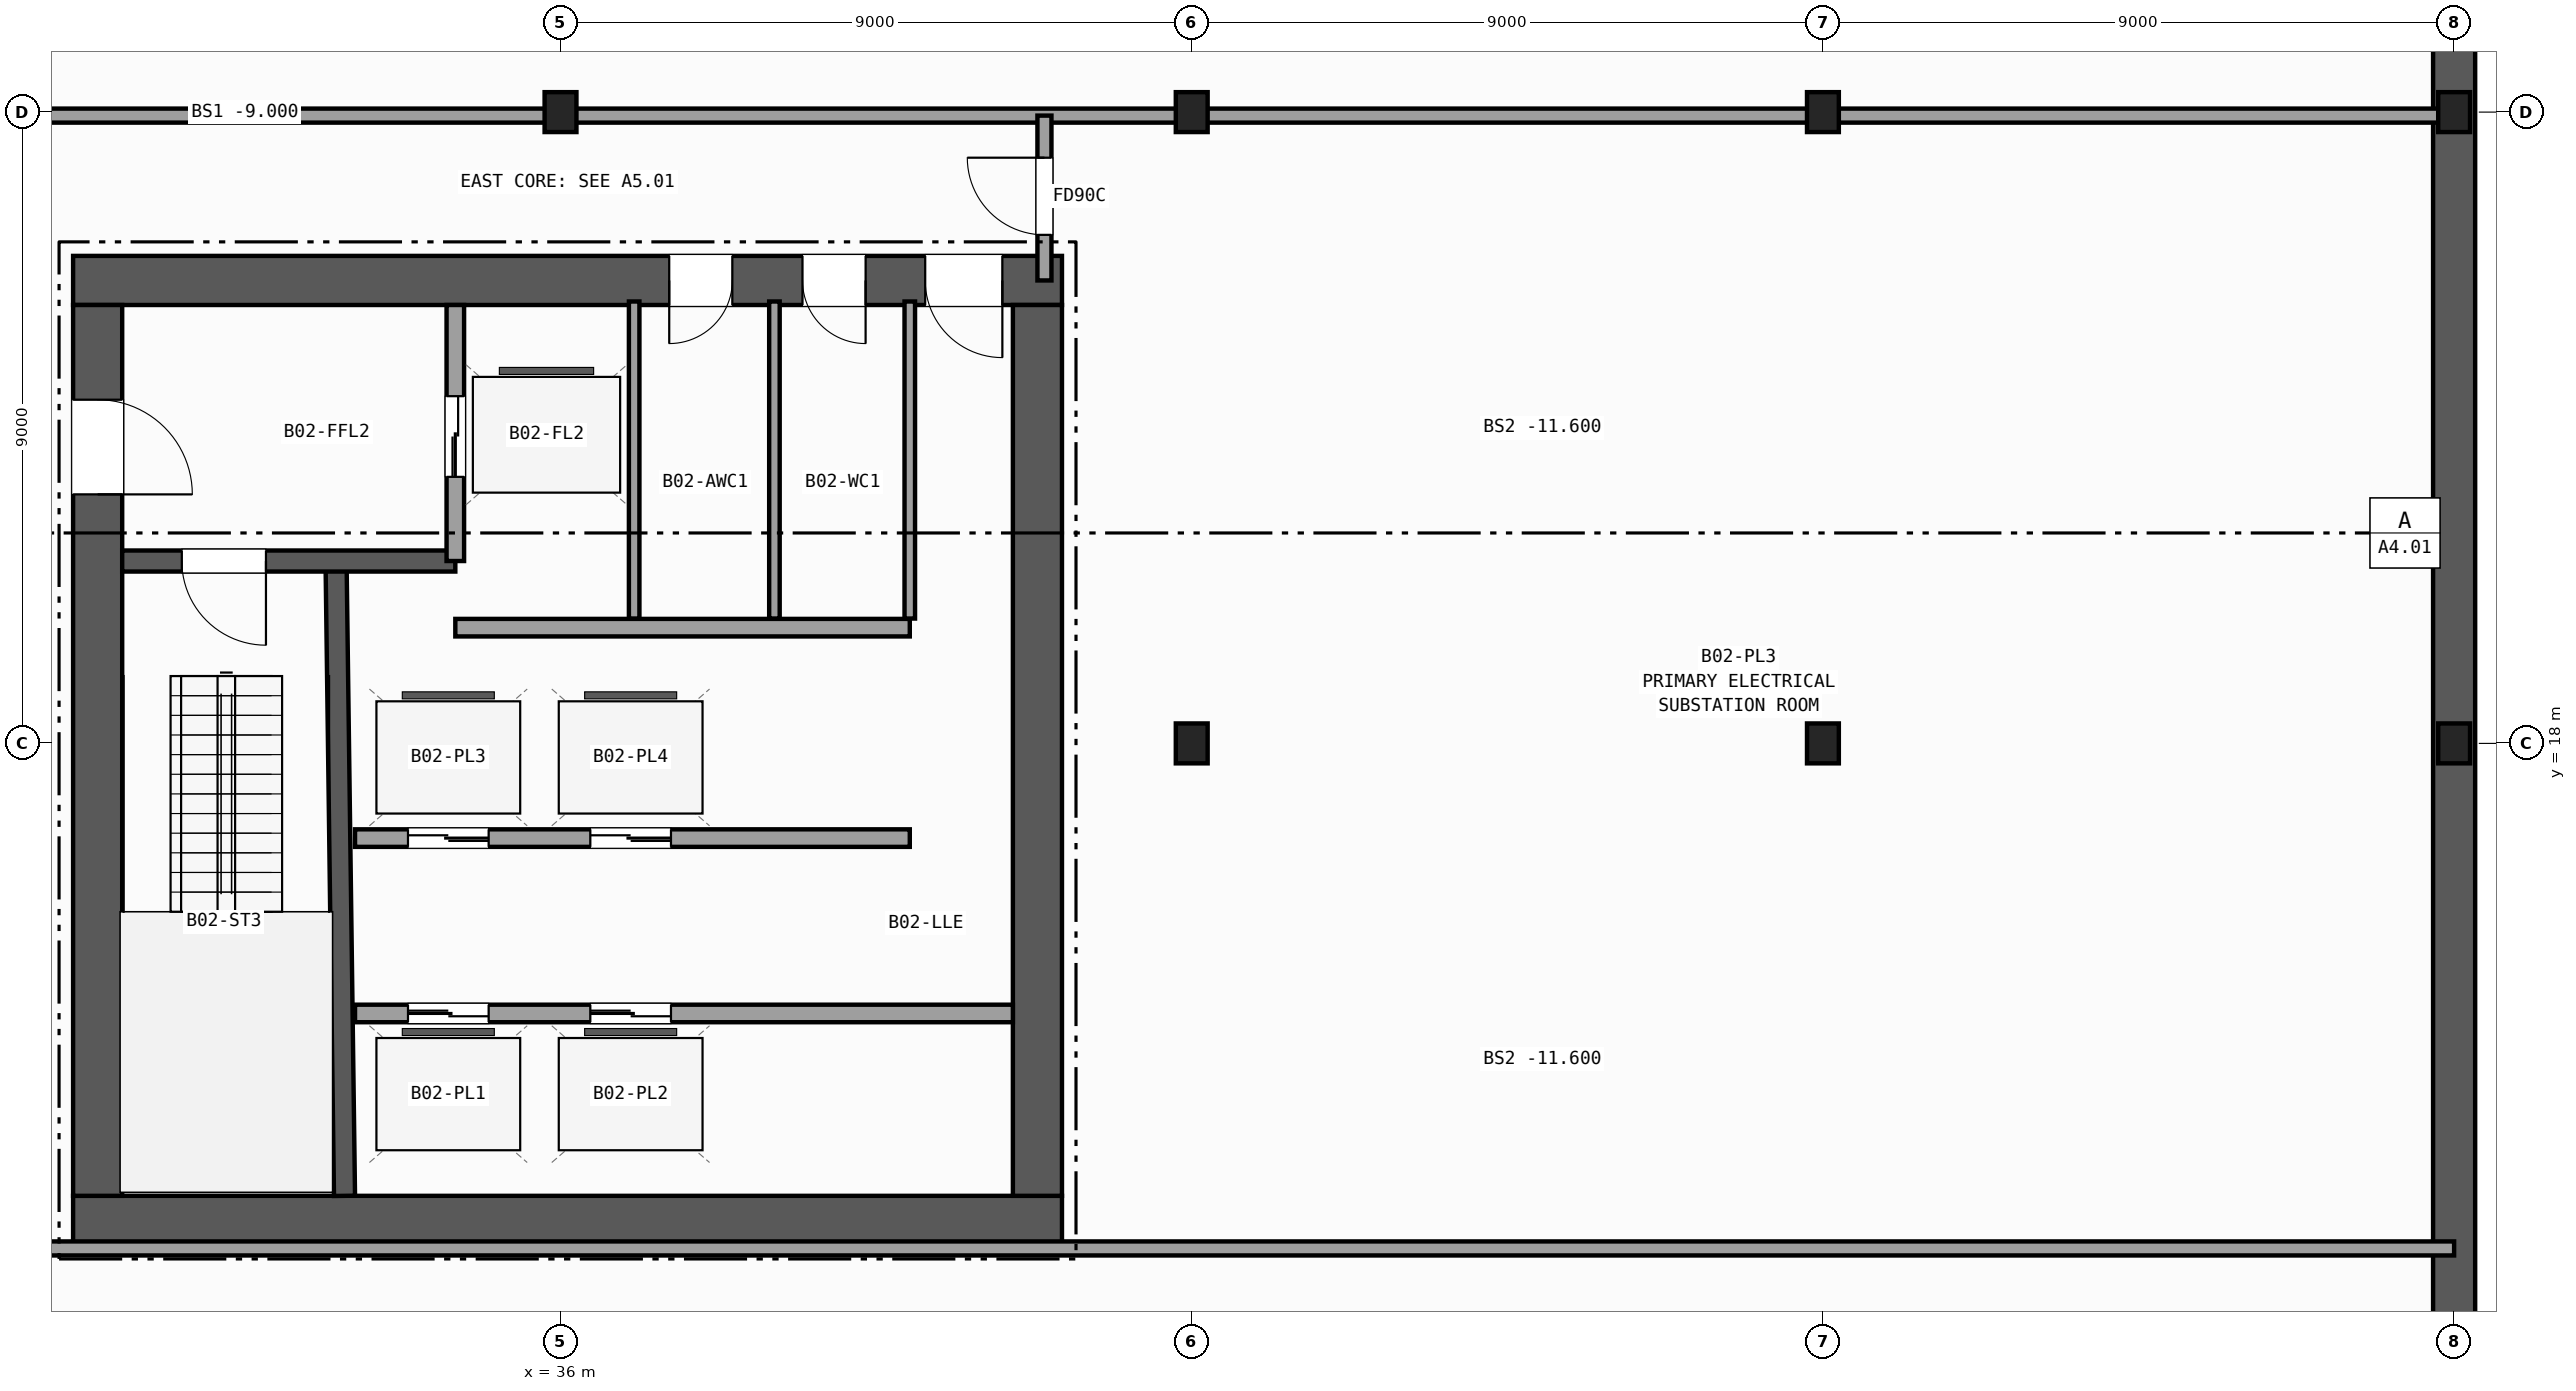
"""IFC4 building model, lengths in metres.
Left out: names, types, materials, properties, quantities, classifications, styles, units other than length and angle.
Written with IfcOpenShell. Run it as: python <this file> out.ifc"""

import sys

from ifc_helpers import new_model, si_unit, direction, frame, frame_2d, origin, origin_2d, place, context, subcontext, project, spatial, rectangle, i_section, extrude, element, fill, save


model = new_model("IFC4")
c1 = context("Model", 3, precision=1e-05, world=origin(), true_north=direction((0.0, 1.0)))
c2 = subcontext(c1, "Body", "Model", "MODEL_VIEW")
j1 = project(units=[si_unit("LENGTHUNIT", "METRE"), si_unit("PLANEANGLEUNIT", "RADIAN")], contexts=[c1])
p1 = place(None, origin())
s1 = spatial("IfcSite", under=j1, at=p1, CompositionType="ELEMENT")
p2 = place(p1, origin())
s2 = spatial("IfcBuilding", under=s1, at=p2, CompositionType="ELEMENT")
p3 = place(p2, frame((0.0, 0.0, -9.0)))
s3 = spatial("IfcBuildingStorey", under=s2, at=p3, CompositionType="ELEMENT", Elevation=-9.0)
for number, where, z_axis, x_axis in (
    (1, (36.0, 27.0, 0.0), (0.0, 0.0, 1.0), (1.0, 0.0, 0.0)),
    (2, (45.0, 18.0, 0.0), (0.0, 0.0, 1.0), (1.0, 0.0, 0.0)),
    (3, (45.0, 27.0, 0.0), (0.0, 0.0, 1.0), (1.0, 0.0, 0.0)),
    (4, (54.0, 18.0, 0.0), (0.0, 0.0, 1.0), (1.0, 0.0, 0.0)),
    (5, (54.0, 27.0, 0.0), (0.0, 0.0, 1.0), (1.0, 0.0, 0.0)),
    (6, (63.0, 18.0, 0.0), (0.0, 0.0, 1.0), (1.0, 0.0, 0.0)),
    (7, (63.0, 27.0, 0.0), (0.0, 0.0, 1.0), (1.0, 0.0, 0.0)),
):
    element("IfcColumn", number, at=place(p3, frame(where, z_axis=z_axis, x_axis=x_axis)), inside=s3, PredefinedType="COLUMN", context=c2, shape_type="SweptSolid", body=[
        extrude(i_section(OverallWidth=0.454, OverallDepth=0.569, WebThickness=0.078, FlangeThickness=0.125, FilletRadius=0.015, at=origin_2d()), origin(), (0.0, 0.0, 1.0), 4.5),
    ])
p4 = place(p3, frame((63.0, 54.3, 0.0), z_axis=(0.0, 0.0, 1.0), x_axis=(0.0, -1.0, 0.0)))
e8 = element("IfcWall", 8, at=p4, inside=s3, PredefinedType="SOLIDWALL", context=c2, shape_type="SweptSolid", body=[
    extrude(rectangle(XDim=54.6, YDim=0.6, at=frame_2d((27.3, 0.0))), origin(), (0.0, 0.0, 1.0), 4.15),
])
p5 = place(p3, frame((29.05, 11.2, 0.0), z_axis=(0.0, 0.0, 1.0), x_axis=(1.0, 0.0, 0.0)))
e9 = element("IfcWall", 9, at=p5, inside=s3, PredefinedType="SHEAR", context=c2, shape_type="SweptSolid", body=[
    extrude(rectangle(XDim=14.1, YDim=0.7, at=frame_2d((7.05, 0.0))), origin(), (0.0, 0.0, 1.0), 4.15),
])
p6 = place(p3, frame((43.15, 24.6, 0.0), z_axis=(0.0, 0.0, 1.0), x_axis=(-1.0, 0.0, 0.0)))
e10 = element("IfcWall", 10, at=p6, inside=s3, PredefinedType="SHEAR", context=c2, shape_type="SweptSolid", body=[
    extrude(rectangle(XDim=14.1, YDim=0.7, at=frame_2d((7.05, 0.0))), origin(), (0.0, 0.0, 1.0), 4.15),
])
p7 = place(p6, frame((0.85, 0.0, 0.0)))
e11 = element("IfcOpeningElement", 11, at=p7, cuts=e10, PredefinedType="OPENING", context=c2, shape_type="SweptSolid", body=[
    extrude(rectangle(XDim=1.1, YDim=2.15, at=frame_2d((0.55, 1.075))), frame((0.0, 0.36, 0.0), z_axis=(0.0, -1.0, 0.0), x_axis=(1.0, 0.0, 0.0)), (0.0, 0.0, 1.0), 0.72),
])
p8 = place(p6, frame((2.8, 0.0, 0.0)))
e12 = element("IfcOpeningElement", 12, at=p8, cuts=e10, PredefinedType="OPENING", context=c2, shape_type="SweptSolid", body=[
    extrude(rectangle(XDim=0.9, YDim=2.1, at=frame_2d((0.45, 1.05))), frame((0.0, 0.36, 0.0), z_axis=(0.0, -1.0, 0.0), x_axis=(1.0, 0.0, 0.0)), (0.0, 0.0, 1.0), 0.72),
])
p9 = place(p6, frame((4.7, 0.0, 0.0)))
e13 = element("IfcOpeningElement", 13, at=p9, cuts=e10, PredefinedType="OPENING", context=c2, shape_type="SweptSolid", body=[
    extrude(rectangle(XDim=0.9, YDim=2.1, at=frame_2d((0.45, 1.05))), frame((0.0, 0.36, 0.0), z_axis=(0.0, -1.0, 0.0), x_axis=(1.0, 0.0, 0.0)), (0.0, 0.0, 1.0), 0.72),
])
p10 = place(p3, frame((29.4, 24.25, 0.0), z_axis=(0.0, 0.0, 1.0), x_axis=(0.0, -1.0, 0.0)))
e14 = element("IfcWall", 14, at=p10, inside=s3, PredefinedType="SHEAR", context=c2, shape_type="SweptSolid", body=[
    extrude(rectangle(XDim=12.7, YDim=0.7, at=frame_2d((6.35, 0.0))), origin(), (0.0, 0.0, 1.0), 4.15),
])
p11 = place(p10, frame((1.35, 0.0, 0.0)))
e15 = element("IfcOpeningElement", 15, at=p11, cuts=e14, PredefinedType="OPENING", context=c2, shape_type="SweptSolid", body=[
    extrude(rectangle(XDim=1.35, YDim=2.15, at=frame_2d((0.675, 1.075))), frame((0.0, 0.36, 0.0), z_axis=(0.0, -1.0, 0.0), x_axis=(1.0, 0.0, 0.0)), (0.0, 0.0, 1.0), 0.72),
])
p12 = place(p3, frame((42.8, 11.55, 0.0), z_axis=(0.0, 0.0, 1.0), x_axis=(0.0, 1.0, 0.0)))
e16 = element("IfcWall", 16, at=p12, inside=s3, PredefinedType="SHEAR", context=c2, shape_type="SweptSolid", body=[
    extrude(rectangle(XDim=12.7, YDim=0.7, at=frame_2d((6.35, 0.0))), origin(), (0.0, 0.0, 1.0), 4.15),
])
p13 = place(p3, frame((32.92, 11.55, 0.0), z_axis=(0.0, 0.0, 1.0), x_axis=(-0.01331804616, 0.99991131089, 0.0)))
e17 = element("IfcWall", 17, at=p13, inside=s3, PredefinedType="SHEAR", context=c2, shape_type="SweptSolid", body=[
    extrude(rectangle(XDim=9.001, YDim=0.3, at=frame_2d((4.5, 0.0))), origin(), (0.0, 0.0, 1.0), 4.15),
])
p14 = place(p3, frame((34.5, 20.6, 0.0), z_axis=(0.0, 0.0, 1.0), x_axis=(-1.0, 0.0, 0.0)))
e18 = element("IfcWall", 18, at=p14, inside=s3, PredefinedType="SHEAR", context=c2, shape_type="SweptSolid", body=[
    extrude(rectangle(XDim=4.75, YDim=0.3, at=frame_2d((2.375, 0.0))), origin(), (0.0, 0.0, 1.0), 4.15),
])
p15 = place(p14, frame((2.7, 0.0, 0.0)))
e19 = element("IfcOpeningElement", 19, at=p15, cuts=e18, PredefinedType="OPENING", context=c2, shape_type="SweptSolid", body=[
    extrude(rectangle(XDim=1.2, YDim=2.15, at=frame_2d((0.6, 1.075))), frame((0.0, 0.16, 0.0), z_axis=(0.0, -1.0, 0.0), x_axis=(1.0, 0.0, 0.0)), (0.0, 0.0, 1.0), 0.32),
])
p16 = place(p3, frame((34.5, 20.6, 0.0), z_axis=(0.0, 0.0, 1.0), x_axis=(0.0, 1.0, 0.0)))
e20 = element("IfcWall", 20, at=p16, inside=s3, PredefinedType="PARTITIONING", context=c2, shape_type="SweptSolid", body=[
    extrude(rectangle(XDim=3.65, YDim=0.25, at=frame_2d((1.825, 0.0))), origin(), (0.0, 0.0, 1.0), 4.15),
])
p17 = place(p16, frame((1.2, 0.0, 0.0)))
e21 = element("IfcOpeningElement", 21, at=p17, cuts=e20, PredefinedType="OPENING", context=c2, shape_type="SweptSolid", body=[
    extrude(rectangle(XDim=1.15, YDim=2.15, at=frame_2d((0.575, 1.075))), frame((0.0, 0.135, 0.0), z_axis=(0.0, -1.0, 0.0), x_axis=(1.0, 0.0, 0.0)), (0.0, 0.0, 1.0), 0.27),
])
p18 = place(p3, frame((34.5, 19.65, 0.0), z_axis=(0.0, 0.0, 1.0), x_axis=(1.0, 0.0, 0.0)))
e22 = element("IfcWall", 22, at=p18, inside=s3, PredefinedType="PARTITIONING", context=c2, shape_type="SweptSolid", body=[
    extrude(rectangle(XDim=6.48, YDim=0.25, at=frame_2d((3.24, 0.0))), origin(), (0.0, 0.0, 1.0), 4.15),
])
p19 = place(p3, frame((33.07, 14.15, 0.0), z_axis=(0.0, 0.0, 1.0), x_axis=(1.0, 0.0, 0.0)))
e23 = element("IfcWall", 23, at=p19, inside=s3, PredefinedType="PARTITIONING", context=c2, shape_type="SweptSolid", body=[
    extrude(rectangle(XDim=9.38, YDim=0.25, at=frame_2d((4.69, 0.0))), origin(), (0.0, 0.0, 1.0), 4.15),
])
p20 = place(p19, frame((0.755, 0.0, 0.0)))
e24 = element("IfcOpeningElement", 24, at=p20, cuts=e23, PredefinedType="OPENING", context=c2, shape_type="SweptSolid", body=[
    extrude(rectangle(XDim=1.15, YDim=2.15, at=frame_2d((0.575, 1.075))), frame((0.0, 0.135, 0.0), z_axis=(0.0, -1.0, 0.0), x_axis=(1.0, 0.0, 0.0)), (0.0, 0.0, 1.0), 0.27),
])
p21 = place(p19, frame((3.355, 0.0, 0.0)))
e25 = element("IfcOpeningElement", 25, at=p21, cuts=e23, PredefinedType="OPENING", context=c2, shape_type="SweptSolid", body=[
    extrude(rectangle(XDim=1.15, YDim=2.15, at=frame_2d((0.575, 1.075))), frame((0.0, 0.135, 0.0), z_axis=(0.0, -1.0, 0.0), x_axis=(1.0, 0.0, 0.0)), (0.0, 0.0, 1.0), 0.27),
])
p22 = place(p3, frame((40.98, 16.65, 0.0), z_axis=(0.0, 0.0, 1.0), x_axis=(-1.0, 0.0, 0.0)))
e26 = element("IfcWall", 26, at=p22, inside=s3, PredefinedType="PARTITIONING", context=c2, shape_type="SweptSolid", body=[
    extrude(rectangle(XDim=7.91, YDim=0.25, at=frame_2d((3.955, 0.0))), origin(), (0.0, 0.0, 1.0), 4.15),
])
p23 = place(p22, frame((6.005, 0.0, 0.0)))
e27 = element("IfcOpeningElement", 27, at=p23, cuts=e26, PredefinedType="OPENING", context=c2, shape_type="SweptSolid", body=[
    extrude(rectangle(XDim=1.15, YDim=2.15, at=frame_2d((0.575, 1.075))), frame((0.0, 0.135, 0.0), z_axis=(0.0, -1.0, 0.0), x_axis=(1.0, 0.0, 0.0)), (0.0, 0.0, 1.0), 0.27),
])
p24 = place(p22, frame((3.405, 0.0, 0.0)))
e28 = element("IfcOpeningElement", 28, at=p24, cuts=e26, PredefinedType="OPENING", context=c2, shape_type="SweptSolid", body=[
    extrude(rectangle(XDim=1.15, YDim=2.15, at=frame_2d((0.575, 1.075))), frame((0.0, 0.135, 0.0), z_axis=(0.0, -1.0, 0.0), x_axis=(1.0, 0.0, 0.0)), (0.0, 0.0, 1.0), 0.27),
])
for number, where, z_axis, x_axis in (
    (29, (37.05, 19.78, 0.0), (0.0, 0.0, 1.0), (0.0, 1.0, 0.0)),
    (30, (39.05, 19.78, 0.0), (0.0, 0.0, 1.0), (0.0, 1.0, 0.0)),
    (31, (40.98, 19.78, 0.0), (0.0, 0.0, 1.0), (0.0, 1.0, 0.0)),
):
    element("IfcWall", number, at=place(p3, frame(where, z_axis=z_axis, x_axis=x_axis)), inside=s3, PredefinedType="PARTITIONING", context=c2, shape_type="SweptSolid", body=[
        extrude(rectangle(XDim=4.52, YDim=0.15, at=frame_2d((2.26, 0.0))), origin(), (0.0, 0.0, 1.0), 4.15),
    ])
p25 = place(p3, frame((27.1, 26.95, 0.0), z_axis=(0.0, 0.0, 1.0), x_axis=(1.0, 0.0, 0.0)))
e32 = element("IfcWall", 32, at=p25, inside=s3, PredefinedType="PARTITIONING", context=c2, shape_type="SweptSolid", body=[
    extrude(rectangle(XDim=35.9, YDim=0.2, at=frame_2d((17.95, 0.0))), origin(), (0.0, 0.0, 1.0), 3.203),
])
p26 = place(p3, frame((42.9, 24.6, 0.0), z_axis=(0.0, 0.0, 1.0), x_axis=(0.0, 1.0, 0.0)))
e33 = element("IfcWall", 33, at=p26, inside=s3, PredefinedType="PARTITIONING", context=c2, shape_type="SweptSolid", body=[
    extrude(rectangle(XDim=2.35, YDim=0.2, at=frame_2d((1.175, 0.0))), origin(), (0.0, 0.0, 1.0), 3.203),
])
p27 = place(p26, frame((0.65, 0.0, 0.0)))
e34 = element("IfcOpeningElement", 34, at=p27, cuts=e33, PredefinedType="OPENING", context=c2, shape_type="SweptSolid", body=[
    extrude(rectangle(XDim=1.1, YDim=2.15, at=frame_2d((0.55, 1.075))), frame((0.0, 0.11, 0.0), z_axis=(0.0, -1.0, 0.0), x_axis=(1.0, 0.0, 0.0)), (0.0, 0.0, 1.0), 0.22),
])
p28 = place(p3, frame((24.65, 10.8, 0.0), z_axis=(0.0, 0.0, 1.0), x_axis=(1.0, 0.0, 0.0)))
e35 = element("IfcWall", 35, at=p28, inside=s3, PredefinedType="PARTITIONING", context=c2, shape_type="SweptSolid", body=[
    extrude(rectangle(XDim=38.35, YDim=0.2, at=frame_2d((19.175, 0.0))), origin(), (0.0, 0.0, 1.0), 3.275),
])
p29 = place(p28, frame((2.0, 0.0, 0.0)))
e36 = element("IfcOpeningElement", 36, at=p29, cuts=e35, PredefinedType="OPENING", context=c2, shape_type="SweptSolid", body=[
    extrude(rectangle(XDim=1.1, YDim=2.15, at=frame_2d((0.55, 1.075))), frame((0.0, 0.11, 0.0), z_axis=(0.0, -1.0, 0.0), x_axis=(1.0, 0.0, 0.0)), (0.0, 0.0, 1.0), 0.22),
])
p30 = place(p15, origin())
e37 = element("IfcDoor", 37, at=p30, inside=s3, OperationType="SINGLE_SWING_LEFT", PredefinedType="DOOR", context=c2, shape_type="SweptSolid", body=[
    extrude(rectangle(XDim=1.2, YDim=2.15, at=frame_2d((0.6, 1.075))), frame((0.0, 0.025, 0.0), z_axis=(0.0, -1.0, 0.0), x_axis=(1.0, 0.0, 0.0)), (0.0, 0.0, 1.0), 0.05),
])
fill(e19, e37)
p31 = place(p11, origin())
e38 = element("IfcDoor", 38, at=p31, inside=s3, OperationType="SINGLE_SWING_RIGHT", PredefinedType="DOOR", context=c2, shape_type="SweptSolid", body=[
    extrude(rectangle(XDim=1.35, YDim=2.15, at=frame_2d((0.675, 1.075))), frame((0.0, 0.025, 0.0), z_axis=(0.0, -1.0, 0.0), x_axis=(1.0, 0.0, 0.0)), (0.0, 0.0, 1.0), 0.05),
])
fill(e15, e38)
p32 = place(p7, origin())
e39 = element("IfcDoor", 39, at=p32, inside=s3, OperationType="SINGLE_SWING_LEFT", PredefinedType="DOOR", context=c2, shape_type="SweptSolid", body=[
    extrude(rectangle(XDim=1.1, YDim=2.15, at=frame_2d((0.55, 1.075))), frame((0.0, 0.025, 0.0), z_axis=(0.0, -1.0, 0.0), x_axis=(1.0, 0.0, 0.0)), (0.0, 0.0, 1.0), 0.05),
])
fill(e11, e39)
p33 = place(p8, origin())
e40 = element("IfcDoor", 40, at=p33, inside=s3, OperationType="SINGLE_SWING_LEFT", PredefinedType="DOOR", context=c2, shape_type="SweptSolid", body=[
    extrude(rectangle(XDim=0.9, YDim=2.1, at=frame_2d((0.45, 1.05))), frame((0.0, 0.025, 0.0), z_axis=(0.0, -1.0, 0.0), x_axis=(1.0, 0.0, 0.0)), (0.0, 0.0, 1.0), 0.05),
])
fill(e12, e40)
p34 = place(p9, origin())
e41 = element("IfcDoor", 41, at=p34, inside=s3, OperationType="SINGLE_SWING_RIGHT", PredefinedType="DOOR", context=c2, shape_type="SweptSolid", body=[
    extrude(rectangle(XDim=0.9, YDim=2.1, at=frame_2d((0.45, 1.05))), frame((0.0, 0.025, 0.0), z_axis=(0.0, -1.0, 0.0), x_axis=(1.0, 0.0, 0.0)), (0.0, 0.0, 1.0), 0.05),
])
fill(e13, e41)
p35 = place(p17, origin())
e42 = element("IfcDoor", 42, at=p35, inside=s3, OperationType="DOUBLE_DOOR_SLIDING", PredefinedType="DOOR", context=c2, shape_type="SweptSolid", body=[
    extrude(rectangle(XDim=1.15, YDim=2.15, at=frame_2d((0.575, 1.075))), frame((0.0, 0.025, 0.0), z_axis=(0.0, -1.0, 0.0), x_axis=(1.0, 0.0, 0.0)), (0.0, 0.0, 1.0), 0.05),
])
fill(e21, e42)
p36 = place(p20, origin())
e43 = element("IfcDoor", 43, at=p36, inside=s3, OperationType="DOUBLE_DOOR_SLIDING", PredefinedType="DOOR", context=c2, shape_type="SweptSolid", body=[
    extrude(rectangle(XDim=1.15, YDim=2.15, at=frame_2d((0.575, 1.075))), frame((0.0, 0.025, 0.0), z_axis=(0.0, -1.0, 0.0), x_axis=(1.0, 0.0, 0.0)), (0.0, 0.0, 1.0), 0.05),
])
fill(e24, e43)
p37 = place(p21, origin())
e44 = element("IfcDoor", 44, at=p37, inside=s3, OperationType="DOUBLE_DOOR_SLIDING", PredefinedType="DOOR", context=c2, shape_type="SweptSolid", body=[
    extrude(rectangle(XDim=1.15, YDim=2.15, at=frame_2d((0.575, 1.075))), frame((0.0, 0.025, 0.0), z_axis=(0.0, -1.0, 0.0), x_axis=(1.0, 0.0, 0.0)), (0.0, 0.0, 1.0), 0.05),
])
fill(e25, e44)
p38 = place(p23, origin())
e45 = element("IfcDoor", 45, at=p38, inside=s3, OperationType="DOUBLE_DOOR_SLIDING", PredefinedType="DOOR", context=c2, shape_type="SweptSolid", body=[
    extrude(rectangle(XDim=1.15, YDim=2.15, at=frame_2d((0.575, 1.075))), frame((0.0, 0.025, 0.0), z_axis=(0.0, -1.0, 0.0), x_axis=(1.0, 0.0, 0.0)), (0.0, 0.0, 1.0), 0.05),
])
fill(e27, e45)
p39 = place(p24, origin())
e46 = element("IfcDoor", 46, at=p39, inside=s3, OperationType="DOUBLE_DOOR_SLIDING", PredefinedType="DOOR", context=c2, shape_type="SweptSolid", body=[
    extrude(rectangle(XDim=1.15, YDim=2.15, at=frame_2d((0.575, 1.075))), frame((0.0, 0.025, 0.0), z_axis=(0.0, -1.0, 0.0), x_axis=(1.0, 0.0, 0.0)), (0.0, 0.0, 1.0), 0.05),
])
fill(e28, e46)
p40 = place(p27, origin())
e47 = element("IfcDoor", 47, at=p40, inside=s3, OperationType="SINGLE_SWING_RIGHT", PredefinedType="DOOR", context=c2, shape_type="SweptSolid", body=[
    extrude(rectangle(XDim=1.1, YDim=2.15, at=frame_2d((0.55, 1.075))), frame((0.0, 0.025, 0.0), z_axis=(0.0, -1.0, 0.0), x_axis=(1.0, 0.0, 0.0)), (0.0, 0.0, 1.0), 0.05),
])
fill(e34, e47)
save(model, sys.argv[1])
